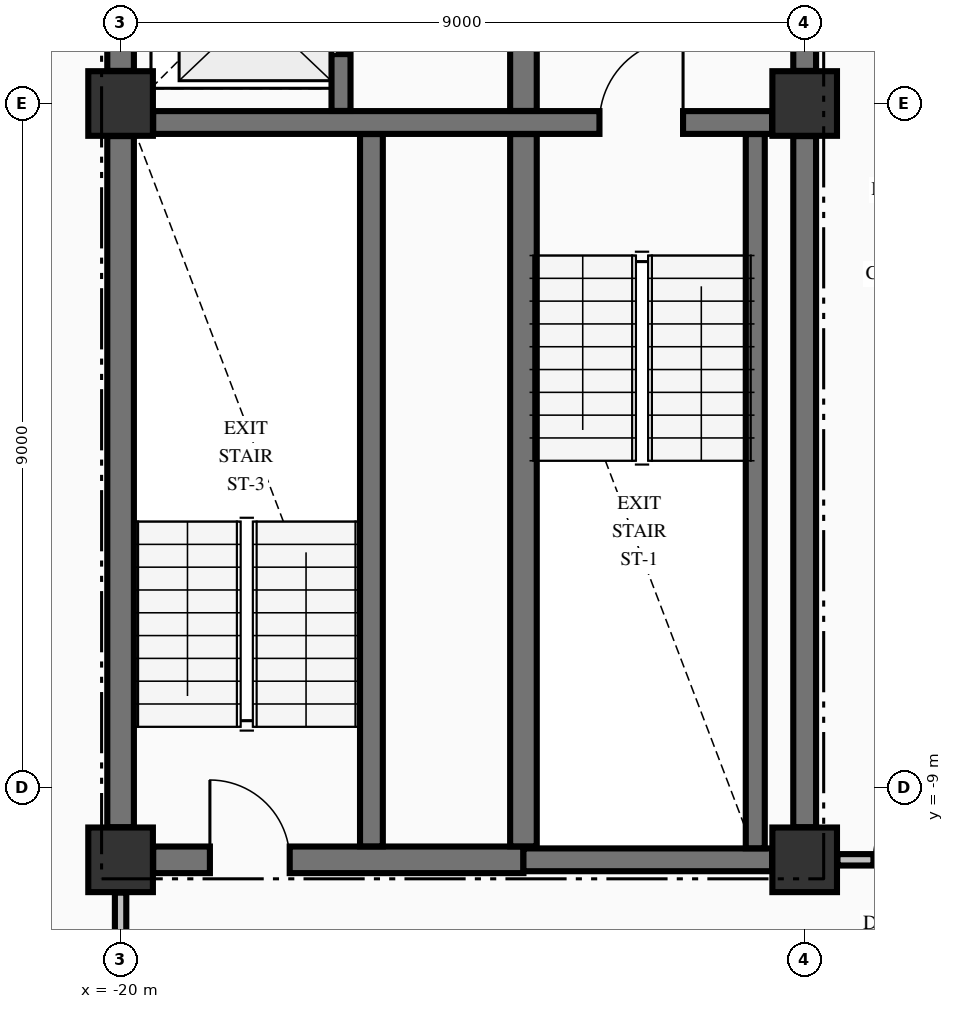
"""IFC4 building model, lengths in metres.
Left out: names, types, materials, properties, quantities, classifications, styles, units other than length and angle.
Written with IfcOpenShell. Run it as: python <this file> out.ifc"""

import sys

from ifc_helpers import new_model, si_unit, direction, frame, frame_2d, origin, origin_2d, place, context, subcontext, project, spatial, rectangle, extrude, element, fill, save


model = new_model("IFC4")
c1 = context("Model", 3, precision=1e-05, world=origin(), true_north=direction((0.0, 1.0)))
c2 = subcontext(c1, "Body", "Model", "MODEL_VIEW")
j1 = project(units=[si_unit("LENGTHUNIT", "METRE"), si_unit("PLANEANGLEUNIT", "RADIAN")], contexts=[c1])
p1 = place(None, origin())
s1 = spatial("IfcSite", under=j1, at=p1, CompositionType="ELEMENT")
p2 = place(p1, origin())
s2 = spatial("IfcBuilding", under=s1, at=p2, CompositionType="ELEMENT")
p3 = place(p2, frame((0.0, 0.0, 172.86)))
s3 = spatial("IfcBuildingStorey", under=s2, at=p3, CompositionType="ELEMENT", Elevation=172.86)
for number, where, z_axis, x_axis in (
    (1, (-20.0, -9.95, -0.25), (0.0, 0.0, 1.0), (1.0, 0.0, 0.0)),
    (2, (-11.0, -9.95, -0.25), (0.0, 0.0, 1.0), (1.0, 0.0, 0.0)),
    (3, (-11.0, 0.0, -0.25), (0.0, 0.0, 1.0), (1.0, 0.0, 0.0)),
    (4, (-20.0, 0.0, -0.25), (0.0, 0.0, 1.0), (1.0, 0.0, 0.0)),
):
    element("IfcColumn", number, at=place(p3, frame(where, z_axis=z_axis, x_axis=x_axis)), inside=s3, PredefinedType="COLUMN", context=c2, shape_type="SweptSolid", body=[
        extrude(rectangle(XDim=0.85, YDim=0.85, at=origin_2d()), origin(), (0.0, 0.0, 1.0), 3.375),
    ])
p4 = place(p3, frame((-19.571, -9.95, 0.0), z_axis=(0.0, 0.0, 1.0), x_axis=(1.0, 0.0, 0.0)))
e5 = element("IfcWall", 5, at=p4, inside=s3, PredefinedType="SHEAR", context=c2, shape_type="SweptSolid", body=[
    extrude(rectangle(XDim=4.871, YDim=0.35, at=frame_2d((2.436, 0.0))), origin(), (0.0, 0.0, 1.0), 3.125),
])
p5 = place(p4, frame((0.746, 0.0, 0.0)))
e6 = element("IfcOpeningElement", 6, at=p5, cuts=e5, PredefinedType="OPENING", context=c2, shape_type="SweptSolid", body=[
    extrude(rectangle(XDim=1.05, YDim=2.15, at=frame_2d((0.525, 1.075))), frame((0.0, 0.185, 0.0), z_axis=(0.0, -1.0, 0.0), x_axis=(1.0, 0.0, 0.0)), (0.0, 0.0, 1.0), 0.37),
])
p6 = place(p3, frame((-14.7, -9.95, 0.0), z_axis=(0.0, 0.0, 1.0), x_axis=(1.0, 0.0, 0.0)))
e7 = element("IfcWall", 7, at=p6, inside=s3, PredefinedType="SHEAR", context=c2, shape_type="SweptSolid", body=[
    extrude(rectangle(XDim=3.271, YDim=0.3, at=frame_2d((1.635, 0.0))), origin(), (0.0, 0.0, 1.0), 3.125),
])
p7 = place(p3, frame((-19.571, -0.25, 0.0), z_axis=(0.0, 0.0, 1.0), x_axis=(1.0, 0.0, 0.0)))
e8 = element("IfcWall", 8, at=p7, inside=s3, PredefinedType="SHEAR", context=c2, shape_type="SweptSolid", body=[
    extrude(rectangle(XDim=8.142, YDim=0.3, at=frame_2d((4.071, 0.0))), origin(), (0.0, 0.0, 1.0), 3.125),
])
p8 = place(p7, frame((5.871, 0.0, 0.0)))
e9 = element("IfcOpeningElement", 9, at=p8, cuts=e8, PredefinedType="OPENING", context=c2, shape_type="SweptSolid", body=[
    extrude(rectangle(XDim=1.1, YDim=2.15, at=frame_2d((0.55, 1.075))), frame((0.0, 0.16, 0.0), z_axis=(0.0, -1.0, 0.0), x_axis=(1.0, 0.0, 0.0)), (0.0, 0.0, 1.0), 0.32),
])
p9 = place(p3, frame((-10.569, -9.95, 0.0), z_axis=(0.0, 0.0, 1.0), x_axis=(1.0, 0.0, 0.0)))
e10 = element("IfcWall", 10, at=p9, inside=s3, PredefinedType="PARTITIONING", context=c2, shape_type="SweptSolid", body=[
    extrude(rectangle(XDim=21.138, YDim=0.15, at=frame_2d((10.569, 0.0))), origin(), (0.0, 0.0, 1.0), 3.125),
])
p10 = place(p9, frame((0.474, 0.0, 0.0)))
e11 = element("IfcOpeningElement", 11, at=p10, cuts=e10, PredefinedType="OPENING", context=c2, shape_type="SweptSolid", body=[
    extrude(rectangle(XDim=1.05, YDim=2.15, at=frame_2d((0.525, 1.075))), frame((0.0, 0.085, 0.0), z_axis=(0.0, -1.0, 0.0), x_axis=(1.0, 0.0, 0.0)), (0.0, 0.0, 1.0), 0.17),
])
p11 = place(p9, frame((19.614, 0.0, 0.0)))
e12 = element("IfcOpeningElement", 12, at=p11, cuts=e10, PredefinedType="OPENING", context=c2, shape_type="SweptSolid", body=[
    extrude(rectangle(XDim=1.05, YDim=2.15, at=frame_2d((0.525, 1.075))), frame((0.0, 0.085, 0.0), z_axis=(0.0, -1.0, 0.0), x_axis=(1.0, 0.0, 0.0)), (0.0, 0.0, 1.0), 0.17),
])
p12 = place(p9, frame((11.774, 0.0, 0.0)))
e13 = element("IfcOpeningElement", 13, at=p12, cuts=e10, PredefinedType="OPENING", context=c2, shape_type="SweptSolid", body=[
    extrude(rectangle(XDim=0.95, YDim=2.15, at=frame_2d((0.475, 1.075))), frame((0.0, 0.085, 0.0), z_axis=(0.0, -1.0, 0.0), x_axis=(1.0, 0.0, 0.0)), (0.0, 0.0, 1.0), 0.17),
])
p13 = place(p3, frame((-20.0, -9.521, 0.0), z_axis=(0.0, 0.0, 1.0), x_axis=(0.0, 1.0, 0.0)))
e14 = element("IfcWall", 14, at=p13, inside=s3, PredefinedType="SHEAR", context=c2, shape_type="SweptSolid", body=[
    extrude(rectangle(XDim=9.092, YDim=0.35, at=frame_2d((4.546, 0.0))), origin(), (0.0, 0.0, 1.0), 3.125),
])
p14 = place(p3, frame((-20.0, 0.429, 0.0), z_axis=(0.0, 0.0, 1.0), x_axis=(0.0, 1.0, 0.0)))
e15 = element("IfcWall", 15, at=p14, inside=s3, PredefinedType="SHEAR", context=c2, shape_type="SweptSolid", body=[
    extrude(rectangle(XDim=2.094, YDim=0.35, at=frame_2d((1.047, 0.0))), origin(), (0.0, 0.0, 1.0), 3.125),
])
p15 = place(p3, frame((-17.1, -0.098, 0.0), z_axis=(0.0, 0.0, 1.0), x_axis=(0.0, 1.0, 0.0)))
e16 = element("IfcWall", 16, at=p15, inside=s3, PredefinedType="SOLIDWALL", context=c2, shape_type="SweptSolid", body=[
    extrude(rectangle(XDim=2.621, YDim=0.25, at=frame_2d((1.311, 0.0))), origin(), (0.0, 0.0, 1.0), 3.125),
])
p16 = place(p15, frame((0.748, 0.0, 0.0)))
e17 = element("IfcOpeningElement", 17, at=p16, cuts=e16, PredefinedType="OPENING", context=c2, shape_type="SweptSolid", body=[
    extrude(rectangle(XDim=1.1, YDim=2.2, at=frame_2d((0.55, 1.1))), frame((0.0, 0.135, 0.0), z_axis=(0.0, -1.0, 0.0), x_axis=(1.0, 0.0, 0.0)), (0.0, 0.0, 1.0), 0.27),
])
p17 = place(p3, frame((-16.7, -9.773, 0.0), z_axis=(0.0, 0.0, 1.0), x_axis=(0.0, 1.0, 0.0)))
e18 = element("IfcWall", 18, at=p17, inside=s3, PredefinedType="SHEAR", context=c2, shape_type="SweptSolid", body=[
    extrude(rectangle(XDim=9.371, YDim=0.3, at=frame_2d((4.686, 0.0))), origin(), (0.0, 0.0, 1.0), 3.125),
])
p18 = place(p3, frame((-14.7, -9.773, 0.0), z_axis=(0.0, 0.0, 1.0), x_axis=(0.0, 1.0, 0.0)))
e19 = element("IfcWall", 19, at=p18, inside=s3, PredefinedType="SHEAR", context=c2, shape_type="SweptSolid", body=[
    extrude(rectangle(XDim=9.371, YDim=0.35, at=frame_2d((4.686, 0.0))), origin(), (0.0, 0.0, 1.0), 3.125),
])
p19 = place(p3, frame((-14.7, -0.098, 0.0), z_axis=(0.0, 0.0, 1.0), x_axis=(0.0, 1.0, 0.0)))
e20 = element("IfcWall", 20, at=p19, inside=s3, PredefinedType="SHEAR", context=c2, shape_type="SweptSolid", body=[
    extrude(rectangle(XDim=2.846, YDim=0.35, at=frame_2d((1.423, 0.0))), origin(), (0.0, 0.0, 1.0), 3.125),
])
p20 = place(p3, frame((-11.65, -9.798, 0.0), z_axis=(0.0, 0.0, 1.0), x_axis=(0.0, 1.0, 0.0)))
e21 = element("IfcWall", 21, at=p20, inside=s3, PredefinedType="SOLIDWALL", context=c2, shape_type="SweptSolid", body=[
    extrude(rectangle(XDim=9.396, YDim=0.25, at=frame_2d((4.698, 0.0))), origin(), (0.0, 0.0, 1.0), 3.125),
])
p21 = place(p3, frame((-11.0, -9.521, 0.0), z_axis=(0.0, 0.0, 1.0), x_axis=(0.0, 1.0, 0.0)))
e22 = element("IfcWall", 22, at=p21, inside=s3, PredefinedType="SHEAR", context=c2, shape_type="SweptSolid", body=[
    extrude(rectangle(XDim=9.092, YDim=0.3, at=frame_2d((4.546, 0.0))), origin(), (0.0, 0.0, 1.0), 3.125),
])
p22 = place(p3, frame((-11.0, 0.429, 0.0), z_axis=(0.0, 0.0, 1.0), x_axis=(0.0, 1.0, 0.0)))
e23 = element("IfcWall", 23, at=p22, inside=s3, PredefinedType="SHEAR", context=c2, shape_type="SweptSolid", body=[
    extrude(rectangle(XDim=2.319, YDim=0.3, at=frame_2d((1.16, 0.0))), origin(), (0.0, 0.0, 1.0), 3.125),
])
p23 = place(p22, frame((0.671, 0.0, 0.0)))
e24 = element("IfcOpeningElement", 24, at=p23, cuts=e23, PredefinedType="OPENING", context=c2, shape_type="SweptSolid", body=[
    extrude(rectangle(XDim=1.1, YDim=2.15, at=frame_2d((0.55, 1.075))), frame((0.0, 0.16, 0.0), z_axis=(0.0, -1.0, 0.0), x_axis=(1.0, 0.0, 0.0)), (0.0, 0.0, 1.0), 0.32),
])
p24 = place(p3, frame((-20.0, -12.122, 0.0), z_axis=(0.0, 0.0, 1.0), x_axis=(0.0, 1.0, 0.0)))
e25 = element("IfcWall", 25, at=p24, inside=s3, PredefinedType="PARTITIONING", context=c2, shape_type="SweptSolid", body=[
    extrude(rectangle(XDim=1.741, YDim=0.15, at=frame_2d((0.871, 0.0))), origin(), (0.0, 0.0, 1.0), 2.317),
])
p25 = place(p8, origin())
e26 = element("IfcDoor", 26, at=p25, inside=s3, OperationType="SINGLE_SWING_RIGHT", PredefinedType="DOOR", context=c2, shape_type="SweptSolid", body=[
    extrude(rectangle(XDim=1.1, YDim=2.15, at=frame_2d((0.55, 1.075))), frame((0.0, 0.025, 0.0), z_axis=(0.0, -1.0, 0.0), x_axis=(1.0, 0.0, 0.0)), (0.0, 0.0, 1.0), 0.05),
])
fill(e9, e26)
p26 = place(p5, origin())
e27 = element("IfcDoor", 27, at=p26, inside=s3, OperationType="SINGLE_SWING_LEFT", PredefinedType="DOOR", context=c2, shape_type="SweptSolid", body=[
    extrude(rectangle(XDim=1.05, YDim=2.15, at=frame_2d((0.525, 1.075))), frame((0.0, 0.025, 0.0), z_axis=(0.0, -1.0, 0.0), x_axis=(1.0, 0.0, 0.0)), (0.0, 0.0, 1.0), 0.05),
])
fill(e6, e27)
p27 = place(p16, origin())
e28 = element("IfcDoor", 28, at=p27, inside=s3, OperationType="SLIDING_TO_LEFT", PredefinedType="DOOR", context=c2, shape_type="SweptSolid", body=[
    extrude(rectangle(XDim=1.1, YDim=2.2, at=frame_2d((0.55, 1.1))), frame((0.0, 0.025, 0.0), z_axis=(0.0, -1.0, 0.0), x_axis=(1.0, 0.0, 0.0)), (0.0, 0.0, 1.0), 0.05),
])
fill(e17, e28)
p28 = place(p10, origin())
e29 = element("IfcDoor", 29, at=p28, inside=s3, OperationType="SINGLE_SWING_RIGHT", PredefinedType="DOOR", context=c2, shape_type="SweptSolid", body=[
    extrude(rectangle(XDim=1.05, YDim=2.15, at=frame_2d((0.525, 1.075))), frame((0.0, 0.025, 0.0), z_axis=(0.0, -1.0, 0.0), x_axis=(1.0, 0.0, 0.0)), (0.0, 0.0, 1.0), 0.05),
])
fill(e11, e29)
save(model, sys.argv[1])
